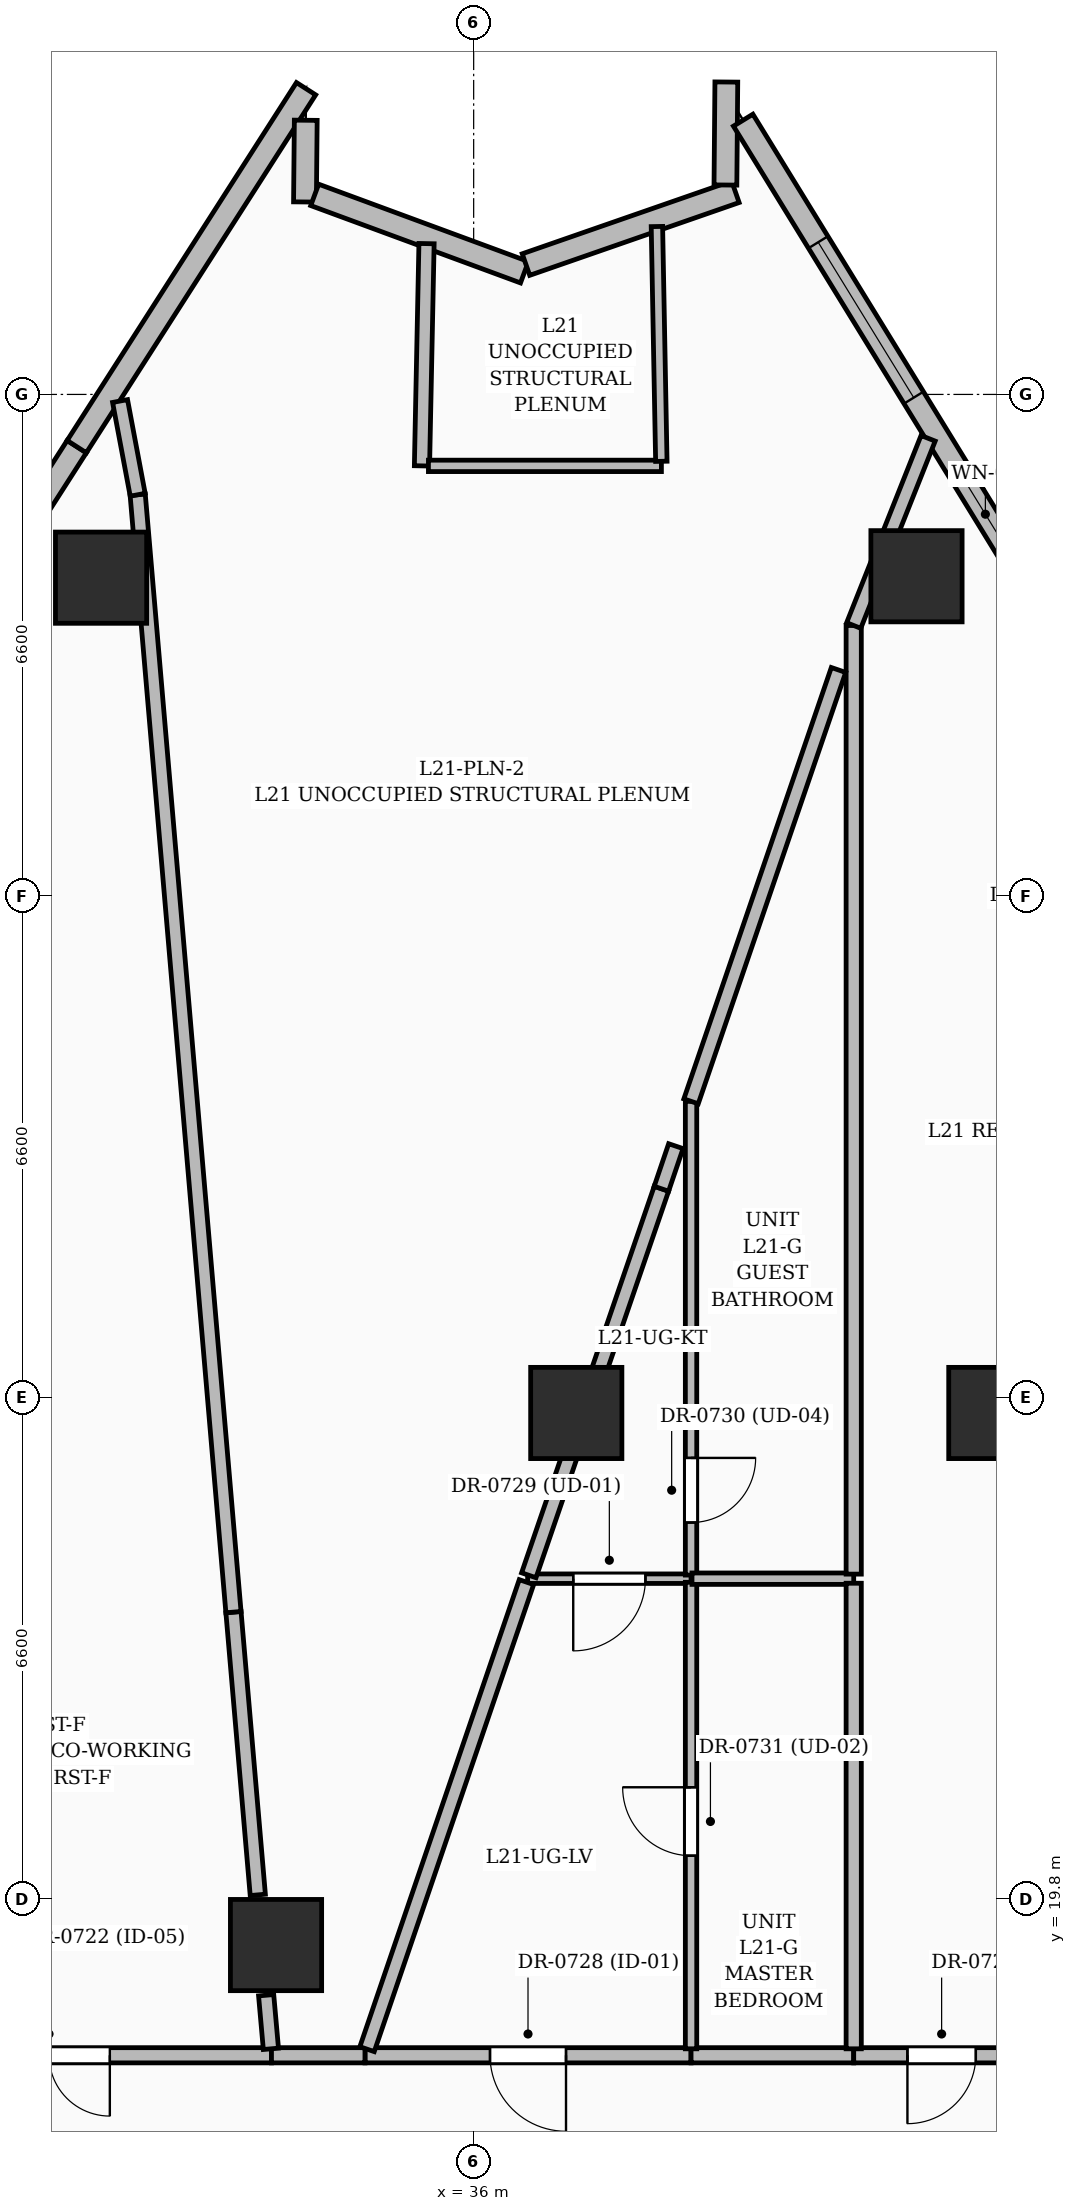
"""IFC4 building model, lengths in metres.
Left out: names, types, materials, properties, quantities, classifications, styles, units other than length and angle.
Written with IfcOpenShell. Run it as: python <this file> out.ifc"""

import sys

from ifc_helpers import new_model, si_unit, direction, frame, frame_2d, origin, origin_2d, place, context, subcontext, project, spatial, rectangle, extrude, element, fill, save


model = new_model("IFC4")
c1 = context("Model", 3, precision=1e-05, world=origin(), true_north=direction((0.0, 1.0)))
c2 = subcontext(c1, "Body", "Model", "MODEL_VIEW")
j1 = project(units=[si_unit("LENGTHUNIT", "METRE"), si_unit("PLANEANGLEUNIT", "RADIAN")], contexts=[c1])
p1 = place(None, origin())
s1 = spatial("IfcSite", under=j1, at=p1, CompositionType="ELEMENT")
p2 = place(p1, origin())
s2 = spatial("IfcBuilding", under=s1, at=p2, CompositionType="ELEMENT")
p3 = place(p2, frame((0.0, 0.0, 85.8)))
s3 = spatial("IfcBuildingStorey", under=s2, at=p3, CompositionType="ELEMENT", Elevation=85.8)
for number, where, z_axis, x_axis in (
    (1, (42.85, 26.2, 0.0), (0.0, 0.0, 1.0), (1.0, 0.0, 0.0)),
    (2, (37.35, 26.2, 0.0), (0.0, 0.0, 1.0), (1.0, 0.0, 0.0)),
    (3, (33.4, 19.2, 0.0), (0.0, 0.0, 1.0), (1.0, 0.0, 0.0)),
    (4, (41.826, 37.208, 0.0), (0.0, 0.0, 1.0), (1.0, 0.0, 0.0)),
    (5, (31.098, 37.189, 0.0), (0.0, 0.0, 1.0), (1.0, 0.0, 0.0)),
):
    element("IfcColumn", number, at=place(p3, frame(where, z_axis=z_axis, x_axis=x_axis)), inside=s3, PredefinedType="COLUMN", context=c2, shape_type="SweptSolid", body=[
        extrude(rectangle(XDim=1.2, YDim=1.2, at=origin_2d()), origin(), (0.0, 0.0, 1.0), 3.6),
    ])
p4 = place(p3, frame((27.541, 33.861, 0.0), z_axis=(0.0, 0.0, 1.0), x_axis=(0.53946350035, 0.842008985576, 0.0)))
e6 = element("IfcWall", 6, at=p4, inside=s3, PredefinedType="SOLIDWALL", context=c2, shape_type="SweptSolid", body=[
    extrude(rectangle(XDim=6.0, YDim=0.3, at=frame_2d((3.0, 0.0))), origin(), (0.0, 0.0, 1.0), 3.35),
])
p5 = place(p4, frame((1.983, 0.0, 0.6)))
e7 = element("IfcOpeningElement", 7, at=p5, cuts=e6, PredefinedType="OPENING", context=c2, shape_type="SweptSolid", body=[
    extrude(rectangle(XDim=2.4, YDim=2.1, at=frame_2d((1.2, 1.05))), frame((0.0, 0.16, 0.0), z_axis=(0.0, -1.0, 0.0), x_axis=(1.0, 0.0, 0.0)), (0.0, 0.0, 1.0), 0.32),
])
p6 = place(p3, frame((30.778, 38.913, 0.0), z_axis=(0.0, 0.0, 1.0), x_axis=(0.53944633572, 0.842019982469, 0.0)))
e8 = element("IfcWall", 8, at=p6, inside=s3, PredefinedType="SOLIDWALL", context=c2, shape_type="SweptSolid", body=[
    extrude(rectangle(XDim=5.593, YDim=0.3, at=frame_2d((2.796, 0.0))), origin(), (0.0, 0.0, 1.0), 3.35),
])
p7 = place(p3, frame((33.791, 43.207, 0.0), z_axis=(0.0, 0.0, 1.0), x_axis=(-0.009538516763, -0.999954507314, 0.0)))
e9 = element("IfcWall", 9, at=p7, inside=s3, PredefinedType="SOLIDWALL", context=c2, shape_type="SweptSolid", body=[
    extrude(rectangle(XDim=1.075, YDim=0.3, at=frame_2d((0.538, 0.0))), origin(), (0.0, 0.0, 1.0), 3.35),
])
p8 = place(p3, frame((33.909, 42.225, 0.0), z_axis=(0.0, 0.0, 1.0), x_axis=(0.938225446259, -0.346024582931, 0.0)))
e10 = element("IfcWall", 10, at=p8, inside=s3, PredefinedType="SOLIDWALL", context=c2, shape_type="SweptSolid", body=[
    extrude(rectangle(XDim=2.941, YDim=0.3, at=frame_2d((1.471, 0.0))), origin(), (0.0, 0.0, 1.0), 3.35),
])
p9 = place(p3, frame((36.688, 41.309, 0.0), z_axis=(0.0, 0.0, 1.0), x_axis=(0.944571305793, 0.328306332978, 0.0)))
e11 = element("IfcWall", 11, at=p9, inside=s3, PredefinedType="SOLIDWALL", context=c2, shape_type="SweptSolid", body=[
    extrude(rectangle(XDim=2.917, YDim=0.3, at=frame_2d((1.458, 0.0))), origin(), (0.0, 0.0, 1.0), 3.35),
])
p10 = place(p3, frame((39.312, 42.355, 0.0), z_axis=(0.0, 0.0, 1.0), x_axis=(0.008828484753, 0.999961028169, 0.0)))
e12 = element("IfcWall", 12, at=p10, inside=s3, PredefinedType="SOLIDWALL", context=c2, shape_type="SweptSolid", body=[
    extrude(rectangle(XDim=1.355, YDim=0.3, at=frame_2d((0.677, 0.0))), origin(), (0.0, 0.0, 1.0), 3.35),
])
p11 = place(p3, frame((39.546, 43.208, 0.0), z_axis=(0.0, 0.0, 1.0), x_axis=(0.523664809677, -0.851924390487, 0.0)))
e13 = element("IfcWall", 13, at=p11, inside=s3, PredefinedType="SOLIDWALL", context=c2, shape_type="SweptSolid", body=[
    extrude(rectangle(XDim=7.369, YDim=0.3, at=frame_2d((3.685, 0.0))), origin(), (0.0, 0.0, 1.0), 3.35),
])
p12 = place(p11, frame((5.485, 0.0, 0.8)))
e14 = element("IfcOpeningElement", 14, at=p12, cuts=e13, PredefinedType="OPENING", context=c2, shape_type="SweptSolid", body=[
    extrude(rectangle(XDim=1.2, YDim=1.8, at=frame_2d((0.6, 0.9))), frame((0.0, 0.16, 0.0), z_axis=(0.0, -1.0, 0.0), x_axis=(1.0, 0.0, 0.0)), (0.0, 0.0, 1.0), 0.32),
])
p13 = place(p11, frame((1.885, 0.0, 0.6)))
e15 = element("IfcOpeningElement", 15, at=p13, cuts=e13, PredefinedType="OPENING", context=c2, shape_type="SweptSolid", body=[
    extrude(rectangle(XDim=2.4, YDim=2.1, at=frame_2d((1.2, 1.05))), frame((0.0, 0.16, 0.0), z_axis=(0.0, -1.0, 0.0), x_axis=(1.0, 0.0, 0.0)), (0.0, 0.0, 1.0), 0.32),
])
p14 = place(p3, frame((33.34, 17.75, 0.0), z_axis=(0.0, 0.0, 1.0), x_axis=(-1.0, 0.0, 0.0)))
e16 = element("IfcWall", 16, at=p14, inside=s3, PredefinedType="PARTITIONING", context=c2, shape_type="SweptSolid", body=[
    extrude(rectangle(XDim=5.97, YDim=0.2, at=frame_2d((2.985, 0.0))), origin(), (0.0, 0.0, 1.0), 3.35),
])
p15 = place(p14, frame((2.127, 0.0, 0.0)))
e17 = element("IfcOpeningElement", 17, at=p15, cuts=e16, PredefinedType="OPENING", context=c2, shape_type="SweptSolid", body=[
    extrude(rectangle(XDim=1.6, YDim=2.3, at=frame_2d((0.8, 1.15))), frame((0.0, 0.11, 0.0), z_axis=(0.0, -1.0, 0.0), x_axis=(1.0, 0.0, 0.0)), (0.0, 0.0, 1.0), 0.22),
])
p16 = place(p3, frame((38.86, 17.75, 0.0), z_axis=(0.0, 0.0, 1.0), x_axis=(-1.0, 0.0, 0.0)))
e18 = element("IfcWall", 18, at=p16, inside=s3, PredefinedType="PARTITIONING", context=c2, shape_type="SweptSolid", body=[
    extrude(rectangle(XDim=4.29, YDim=0.2, at=frame_2d((2.145, 0.0))), origin(), (0.0, 0.0, 1.0), 3.35),
])
p17 = place(p16, frame((1.645, 0.0, 0.0)))
e19 = element("IfcOpeningElement", 19, at=p17, cuts=e18, PredefinedType="OPENING", context=c2, shape_type="SweptSolid", body=[
    extrude(rectangle(XDim=1.0, YDim=2.2, at=frame_2d((0.5, 1.1))), frame((0.0, 0.11, 0.0), z_axis=(0.0, -1.0, 0.0), x_axis=(1.0, 0.0, 0.0)), (0.0, 0.0, 1.0), 0.22),
])
p18 = place(p3, frame((41.0, 17.75, 0.0), z_axis=(0.0, 0.0, 1.0), x_axis=(-1.0, 0.0, 0.0)))
e20 = element("IfcWall", 20, at=p18, inside=s3, PredefinedType="PARTITIONING", context=c2, shape_type="SweptSolid", body=[
    extrude(rectangle(XDim=2.14, YDim=0.2, at=frame_2d((1.07, 0.0))), origin(), (0.0, 0.0, 1.0), 3.35),
])
p19 = place(p3, frame((34.57, 17.75, 0.0), z_axis=(0.0, 0.0, 1.0), x_axis=(-1.0, 0.0, 0.0)))
e21 = element("IfcWall", 21, at=p19, inside=s3, PredefinedType="PARTITIONING", context=c2, shape_type="SweptSolid", body=[
    extrude(rectangle(XDim=1.23, YDim=0.2, at=frame_2d((0.615, 0.0))), origin(), (0.0, 0.0, 1.0), 2.309),
])
p20 = place(p3, frame((43.2, 17.75, 0.0), z_axis=(0.0, 0.0, 1.0), x_axis=(-1.0, 0.0, 0.0)))
e22 = element("IfcWall", 22, at=p20, inside=s3, PredefinedType="PARTITIONING", context=c2, shape_type="SweptSolid", body=[
    extrude(rectangle(XDim=2.2, YDim=0.2, at=frame_2d((1.1, 0.0))), origin(), (0.0, 0.0, 1.0), 3.35),
])
p21 = place(p20, frame((0.593, 0.0, 0.0)))
e23 = element("IfcOpeningElement", 23, at=p21, cuts=e22, PredefinedType="OPENING", context=c2, shape_type="SweptSolid", body=[
    extrude(rectangle(XDim=0.9, YDim=2.1, at=frame_2d((0.45, 1.05))), frame((0.0, 0.11, 0.0), z_axis=(0.0, -1.0, 0.0), x_axis=(1.0, 0.0, 0.0)), (0.0, 0.0, 1.0), 0.22),
])
p22 = place(p3, frame((33.16, 19.86, 0.0), z_axis=(0.0, 0.0, 1.0), x_axis=(-0.08565893025, 0.996324519255, 0.0)))
e24 = element("IfcWall", 24, at=p22, inside=s3, PredefinedType="PARTITIONING", context=c2, shape_type="SweptSolid", body=[
    extrude(rectangle(XDim=3.734, YDim=0.2, at=frame_2d((1.867, 0.0))), origin(), (0.0, 0.0, 1.0), 3.35),
])
p23 = place(p3, frame((33.333, 17.835, 0.0), z_axis=(0.0, 0.0, 1.0), x_axis=(-0.08826611765, 0.996096929257, 0.0)))
e25 = element("IfcWall", 25, at=p23, inside=s3, PredefinedType="PARTITIONING", context=c2, shape_type="SweptSolid", body=[
    extrude(rectangle(XDim=0.708, YDim=0.2, at=frame_2d((0.354, 0.0))), origin(), (0.0, 0.0, 1.0), 3.35),
])
p24 = place(p3, frame((32.84, 23.58, 0.0), z_axis=(0.0, 0.0, 1.0), x_axis=(-0.085402080026, 0.996346568583, 0.0)))
e26 = element("IfcWall", 26, at=p24, inside=s3, PredefinedType="PARTITIONING", context=c2, shape_type="SweptSolid", body=[
    extrude(rectangle(XDim=14.754, YDim=0.2, at=frame_2d((7.377, 0.0))), origin(), (0.0, 0.0, 1.0), 2.345),
])
p25 = place(p3, frame((31.58, 38.28, 0.0), z_axis=(0.0, 0.0, 1.0), x_axis=(-0.185063937558, 0.982726482301, 0.0)))
e27 = element("IfcWall", 27, at=p25, inside=s3, PredefinedType="PARTITIONING", context=c2, shape_type="SweptSolid", body=[
    extrude(rectangle(XDim=1.255, YDim=0.2, at=frame_2d((0.627, 0.0))), origin(), (0.0, 0.0, 1.0), 3.35),
])
p26 = place(p3, frame((38.86, 24.02, 0.0), z_axis=(0.0, 0.0, 1.0), x_axis=(-1.0, 0.0, 0.0)))
e28 = element("IfcWall", 28, at=p26, inside=s3, PredefinedType="PARTITIONING", context=c2, shape_type="SweptSolid", body=[
    extrude(rectangle(XDim=2.15, YDim=0.125, at=frame_2d((1.075, 0.0))), origin(), (0.0, 0.0, 1.0), 3.35),
])
p27 = place(p26, frame((0.6, 0.0, 0.0)))
e29 = element("IfcOpeningElement", 29, at=p27, cuts=e28, PredefinedType="OPENING", context=c2, shape_type="SweptSolid", body=[
    extrude(rectangle(XDim=0.95, YDim=2.2, at=frame_2d((0.475, 1.1))), frame((0.0, 0.072, 0.0), z_axis=(0.0, -1.0, 0.0), x_axis=(1.0, 0.0, 0.0)), (0.0, 0.0, 1.0), 0.145),
])
p28 = place(p3, frame((38.86, 17.835, 0.0), z_axis=(0.0, 0.0, 1.0), x_axis=(0.0, 1.0, 0.0)))
e30 = element("IfcWall", 30, at=p28, inside=s3, PredefinedType="PARTITIONING", context=c2, shape_type="SweptSolid", body=[
    extrude(rectangle(XDim=6.137, YDim=0.15, at=frame_2d((3.069, 0.0))), origin(), (0.0, 0.0, 1.0), 2.853),
])
p29 = place(p28, frame((2.541, 0.0, 0.0)))
e31 = element("IfcOpeningElement", 31, at=p29, cuts=e30, PredefinedType="OPENING", context=c2, shape_type="SweptSolid", body=[
    extrude(rectangle(XDim=0.9, YDim=2.15, at=frame_2d((0.45, 1.075))), frame((0.0, 0.085, 0.0), z_axis=(0.0, -1.0, 0.0), x_axis=(1.0, 0.0, 0.0)), (0.0, 0.0, 1.0), 0.17),
])
p30 = place(p3, frame((38.86, 30.3, 0.0), z_axis=(0.0, 0.0, 1.0), x_axis=(0.0, -1.0, 0.0)))
e32 = element("IfcWall", 32, at=p30, inside=s3, PredefinedType="PARTITIONING", context=c2, shape_type="SweptSolid", body=[
    extrude(rectangle(XDim=6.233, YDim=0.15, at=frame_2d((3.116, 0.0))), origin(), (0.0, 0.0, 1.0), 2.309),
])
p31 = place(p30, frame((4.691, 0.0, 0.0)))
e33 = element("IfcOpeningElement", 33, at=p31, cuts=e32, PredefinedType="OPENING", context=c2, shape_type="SweptSolid", body=[
    extrude(rectangle(XDim=0.85, YDim=2.1, at=frame_2d((0.425, 1.05))), frame((0.0, 0.085, 0.0), z_axis=(0.0, -1.0, 0.0), x_axis=(1.0, 0.0, 0.0)), (0.0, 0.0, 1.0), 0.17),
])
p32 = place(p3, frame((38.873, 24.02, 0.0), z_axis=(0.0, 0.0, 1.0), x_axis=(1.0, 0.0, 0.0)))
e34 = element("IfcWall", 34, at=p32, inside=s3, PredefinedType="PARTITIONING", context=c2, shape_type="SweptSolid", body=[
    extrude(rectangle(XDim=2.127, YDim=0.15, at=frame_2d((1.064, 0.0))), origin(), (0.0, 0.0, 1.0), 3.35),
])
p33 = place(p3, frame((41.0, 24.08, 0.0), z_axis=(0.0, 0.0, 1.0), x_axis=(0.0, 1.0, 0.0)))
e35 = element("IfcWall", 35, at=p33, inside=s3, PredefinedType="PARTITIONING", context=c2, shape_type="SweptSolid", body=[
    extrude(rectangle(XDim=12.48, YDim=0.2, at=frame_2d((6.24, 0.0))), origin(), (0.0, 0.0, 1.0), 2.309),
])
p34 = place(p3, frame((40.8, 35.975, 0.0), z_axis=(0.0, 0.0, 1.0), x_axis=(-0.32346038507, -0.946241712931, 0.0)))
e36 = element("IfcWall", 36, at=p34, inside=s3, PredefinedType="PARTITIONING", context=c2, shape_type="SweptSolid", body=[
    extrude(rectangle(XDim=5.998, YDim=0.2, at=frame_2d((2.999, 0.0))), origin(), (0.0, 0.0, 1.0), 2.712),
])
p35 = place(p3, frame((38.47, 29.15, 0.0), z_axis=(0.0, 0.0, 1.0), x_axis=(-0.324526339913, -0.94587665935, 0.0)))
e37 = element("IfcWall", 37, at=p35, inside=s3, PredefinedType="PARTITIONING", context=c2, shape_type="SweptSolid", body=[
    extrude(rectangle(XDim=5.376, YDim=0.2, at=frame_2d((2.688, 0.0))), origin(), (0.0, 0.0, 1.0), 2.309),
])
p36 = place(p3, frame((38.66, 29.71, 0.0), z_axis=(0.0, 0.0, 1.0), x_axis=(-0.321051827957, -0.947061626171, 0.0)))
e38 = element("IfcWall", 38, at=p36, inside=s3, PredefinedType="PARTITIONING", context=c2, shape_type="SweptSolid", body=[
    extrude(rectangle(XDim=0.592, YDim=0.2, at=frame_2d((0.296, 0.0))), origin(), (0.0, 0.0, 1.0), 2.712),
])
p37 = place(p3, frame((41.0, 17.835, 0.0), z_axis=(0.0, 0.0, 1.0), x_axis=(0.0, 1.0, 0.0)))
e39 = element("IfcWall", 39, at=p37, inside=s3, PredefinedType="PARTITIONING", context=c2, shape_type="SweptSolid", body=[
    extrude(rectangle(XDim=6.125, YDim=0.2, at=frame_2d((3.062, 0.0))), origin(), (0.0, 0.0, 1.0), 2.853),
])
p38 = place(p3, frame((35.32, 38.66, 0.0), z_axis=(0.0, 0.0, 1.0), x_axis=(0.020451595294, 0.999790844252, 0.0)))
e40 = element("IfcWall", 40, at=p38, inside=s3, PredefinedType="PARTITIONING", context=c2, shape_type="SweptSolid", body=[
    extrude(rectangle(XDim=2.925, YDim=0.2, at=frame_2d((1.462, 0.0))), origin(), (0.0, 0.0, 1.0), 3.35),
])
p39 = place(p3, frame((41.979, 39.023, 0.0), z_axis=(0.0, 0.0, 1.0), x_axis=(-0.369388654108, -0.929274998166, 0.0)))
e41 = element("IfcWall", 41, at=p39, inside=s3, PredefinedType="PARTITIONING", context=c2, shape_type="SweptSolid", body=[
    extrude(rectangle(XDim=2.65, YDim=0.2, at=frame_2d((1.325, 0.0))), origin(), (0.0, 0.0, 1.0), 2.37),
])
p40 = place(p3, frame((38.47, 38.66, 0.0), z_axis=(0.0, 0.0, 1.0), x_axis=(-1.0, 0.0, 0.0)))
e42 = element("IfcWall", 42, at=p40, inside=s3, PredefinedType="PARTITIONING", context=c2, shape_type="SweptSolid", body=[
    extrude(rectangle(XDim=3.065, YDim=0.15, at=frame_2d((1.532, 0.0))), origin(), (0.0, 0.0, 1.0), 3.35),
])
p41 = place(p3, frame((38.411, 41.809, 0.0), z_axis=(0.0, 0.0, 1.0), x_axis=(0.0188064418, -0.999823143234, 0.0)))
e43 = element("IfcWall", 43, at=p41, inside=s3, PredefinedType="PARTITIONING", context=c2, shape_type="SweptSolid", body=[
    extrude(rectangle(XDim=3.09, YDim=0.15, at=frame_2d((1.545, 0.0))), origin(), (0.0, 0.0, 1.0), 3.35),
])
p42 = place(p3, frame((36.695, 23.975, 0.0), z_axis=(0.0, 0.0, 1.0), x_axis=(-0.322999292012, -0.946399206128, 0.0)))
e44 = element("IfcWall", 44, at=p42, inside=s3, PredefinedType="PARTITIONING", context=c2, shape_type="SweptSolid", body=[
    extrude(rectangle(XDim=6.493, YDim=0.2, at=frame_2d((3.246, 0.0))), origin(), (0.0, 0.0, 1.0), 2.853),
])
p43 = place(p12, origin())
e45 = element("IfcWindow", 45, at=p43, inside=s3, PartitioningType="SINGLE_PANEL", PredefinedType="WINDOW", context=c2, shape_type="SweptSolid", body=[
    extrude(rectangle(XDim=1.2, YDim=1.8, at=frame_2d((0.6, 0.9))), frame((0.0, 0.03, 0.0), z_axis=(0.0, -1.0, 0.0), x_axis=(1.0, 0.0, 0.0)), (0.0, 0.0, 1.0), 0.06),
])
fill(e14, e45)
p44 = place(p13, origin())
e46 = element("IfcWindow", 46, at=p44, inside=s3, PartitioningType="SINGLE_PANEL", PredefinedType="WINDOW", context=c2, shape_type="SweptSolid", body=[
    extrude(rectangle(XDim=2.4, YDim=2.1, at=frame_2d((1.2, 1.05))), frame((0.0, 0.03, 0.0), z_axis=(0.0, -1.0, 0.0), x_axis=(1.0, 0.0, 0.0)), (0.0, 0.0, 1.0), 0.06),
])
fill(e15, e46)
p45 = place(p15, origin())
e47 = element("IfcDoor", 47, at=p45, inside=s3, OperationType="DOUBLE_DOOR_SINGLE_SWING", PredefinedType="DOOR", context=c2, shape_type="SweptSolid", body=[
    extrude(rectangle(XDim=1.6, YDim=2.3, at=frame_2d((0.8, 1.15))), frame((0.0, 0.025, 0.0), z_axis=(0.0, -1.0, 0.0), x_axis=(1.0, 0.0, 0.0)), (0.0, 0.0, 1.0), 0.05),
])
fill(e17, e47)
p46 = place(p21, origin())
e48 = element("IfcDoor", 48, at=p46, inside=s3, OperationType="SINGLE_SWING_RIGHT", PredefinedType="DOOR", context=c2, shape_type="SweptSolid", body=[
    extrude(rectangle(XDim=0.9, YDim=2.1, at=frame_2d((0.45, 1.05))), frame((0.0, 0.025, 0.0), z_axis=(0.0, -1.0, 0.0), x_axis=(1.0, 0.0, 0.0)), (0.0, 0.0, 1.0), 0.05),
])
fill(e23, e48)
p47 = place(p17, origin())
e49 = element("IfcDoor", 49, at=p47, inside=s3, OperationType="SINGLE_SWING_LEFT", PredefinedType="DOOR", context=c2, shape_type="SweptSolid", body=[
    extrude(rectangle(XDim=1.0, YDim=2.2, at=frame_2d((0.5, 1.1))), frame((0.0, 0.025, 0.0), z_axis=(0.0, -1.0, 0.0), x_axis=(1.0, 0.0, 0.0)), (0.0, 0.0, 1.0), 0.05),
])
fill(e19, e49)
p48 = place(p27, origin())
e50 = element("IfcDoor", 50, at=p48, inside=s3, OperationType="SINGLE_SWING_RIGHT", PredefinedType="DOOR", context=c2, shape_type="SweptSolid", body=[
    extrude(rectangle(XDim=0.95, YDim=2.2, at=frame_2d((0.475, 1.1))), frame((0.0, 0.025, 0.0), z_axis=(0.0, -1.0, 0.0), x_axis=(1.0, 0.0, 0.0)), (0.0, 0.0, 1.0), 0.05),
])
fill(e29, e50)
p49 = place(p31, origin())
e51 = element("IfcDoor", 51, at=p49, inside=s3, OperationType="SINGLE_SWING_LEFT", PredefinedType="DOOR", context=c2, shape_type="SweptSolid", body=[
    extrude(rectangle(XDim=0.85, YDim=2.1, at=frame_2d((0.425, 1.05))), frame((0.0, 0.025, 0.0), z_axis=(0.0, -1.0, 0.0), x_axis=(1.0, 0.0, 0.0)), (0.0, 0.0, 1.0), 0.05),
])
fill(e33, e51)
p50 = place(p29, origin())
e52 = element("IfcDoor", 52, at=p50, inside=s3, OperationType="SINGLE_SWING_RIGHT", PredefinedType="DOOR", context=c2, shape_type="SweptSolid", body=[
    extrude(rectangle(XDim=0.9, YDim=2.15, at=frame_2d((0.45, 1.075))), frame((0.0, 0.025, 0.0), z_axis=(0.0, -1.0, 0.0), x_axis=(1.0, 0.0, 0.0)), (0.0, 0.0, 1.0), 0.05),
])
fill(e31, e52)
save(model, sys.argv[1])
